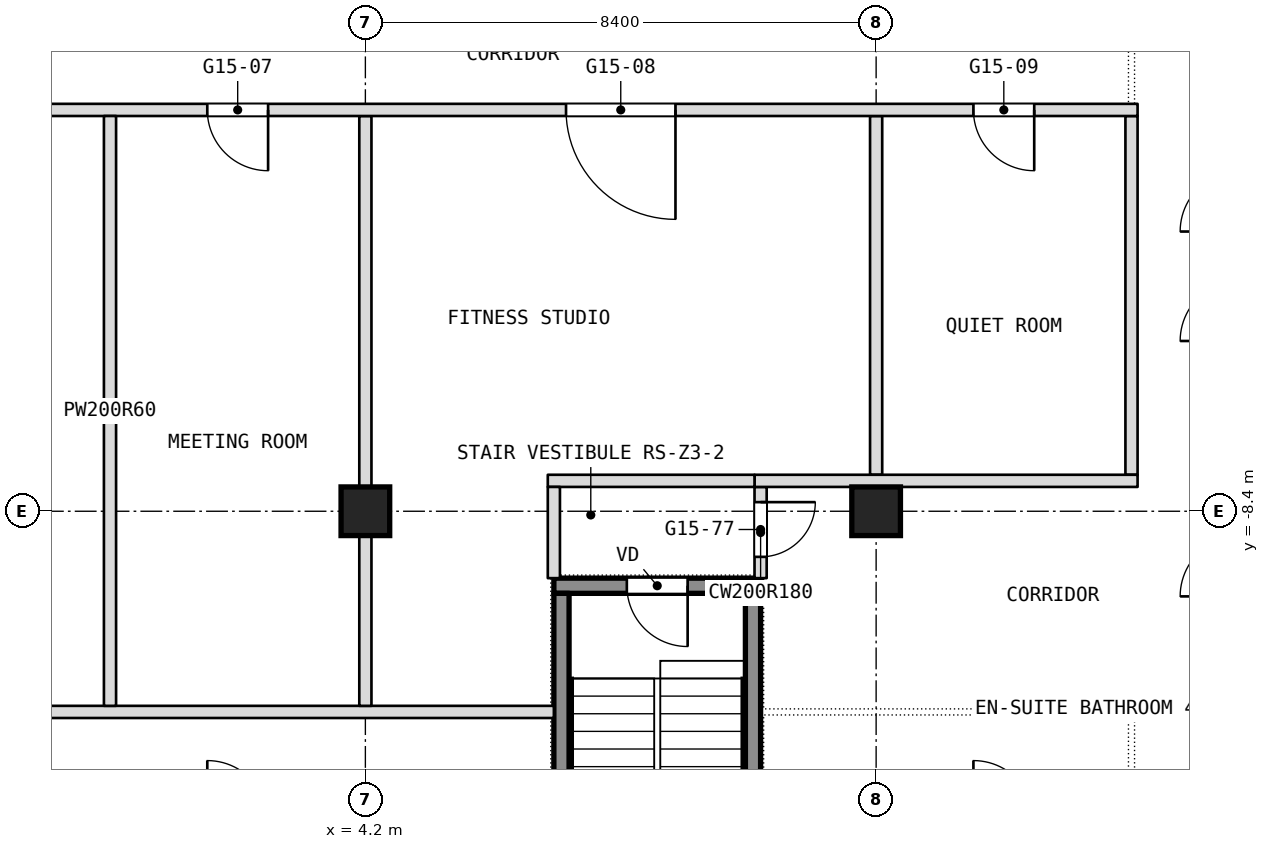
"""IFC4 building model, lengths in metres.
Left out: names, types, materials, properties, quantities, classifications, styles, units other than length and angle.
Written with IfcOpenShell. Run it as: python <this file> out.ifc"""

import sys

from ifc_helpers import new_model, si_unit, direction, frame, frame_2d, origin, origin_2d, place, context, subcontext, project, spatial, rectangle, extrude, element, fill, save


model = new_model("IFC4")
c1 = context("Model", 3, precision=1e-05, world=origin(), true_north=direction((0.0, 1.0)))
c2 = subcontext(c1, "Body", "Model", "MODEL_VIEW")
j1 = project(units=[si_unit("LENGTHUNIT", "METRE"), si_unit("PLANEANGLEUNIT", "RADIAN")], contexts=[c1])
p1 = place(None, origin())
s1 = spatial("IfcSite", under=j1, at=p1, CompositionType="ELEMENT")
p2 = place(p1, origin())
s2 = spatial("IfcBuilding", under=s1, at=p2, CompositionType="ELEMENT")
p3 = place(p2, frame((0.0, 0.0, 191.3)))
s3 = spatial("IfcBuildingStorey", under=s2, at=p3, CompositionType="ELEMENT", Elevation=191.3)
for number, where, z_axis, x_axis in (
    (1, (4.2, -8.4, 0.0), (0.0, 0.0, 1.0), (1.0, 0.0, 0.0)),
    (2, (12.6, -8.4, 0.0), (0.0, 0.0, 1.0), (1.0, 0.0, 0.0)),
):
    element("IfcColumn", number, at=place(p3, frame(where, z_axis=z_axis, x_axis=x_axis)), inside=s3, PredefinedType="COLUMN", context=c2, shape_type="SweptSolid", body=[
        extrude(rectangle(XDim=0.8, YDim=0.8, at=origin_2d()), origin(), (0.0, 0.0, 1.0), 3.6),
    ])
for number, where, z_axis, x_axis in (
    (3, (16.8, -7.8, 0.0), (0.0, 0.0, 1.0), (0.0, 1.0, 0.0)),
    (4, (12.6, -7.8, 0.0), (0.0, 0.0, 1.0), (0.0, 1.0, 0.0)),
):
    element("IfcWall", number, at=place(p3, frame(where, z_axis=z_axis, x_axis=x_axis)), inside=s3, PredefinedType="PARTITIONING", context=c2, shape_type="SweptSolid", body=[
        extrude(rectangle(XDim=5.9, YDim=0.2, at=frame_2d((2.95, 0.0))), origin(), (0.0, 0.0, 1.0), 3.34),
    ])
p4 = place(p3, frame((-7.3, -11.7, 0.0), z_axis=(0.0, 0.0, 1.0), x_axis=(1.0, 0.0, 0.0)))
e5 = element("IfcWall", 5, at=p4, inside=s3, PredefinedType="PARTITIONING", context=c2, shape_type="SweptSolid", body=[
    extrude(rectangle(XDim=14.6, YDim=0.2, at=frame_2d((7.3, 0.0))), origin(), (0.0, 0.0, 1.0), 3.34),
])
p5 = place(p3, frame((10.7, -9.5, 0.0), z_axis=(0.0, 0.0, 1.0), x_axis=(0.0, 1.0, 0.0)))
e6 = element("IfcWall", 6, at=p5, inside=s3, PredefinedType="PARTITIONING", context=c2, shape_type="SweptSolid", body=[
    extrude(rectangle(XDim=1.5, YDim=0.2, at=frame_2d((0.75, 0.0))), origin(), (0.0, 0.0, 1.0), 3.34),
])
p6 = place(p5, frame((0.35, 0.0, 0.0)))
e7 = element("IfcOpeningElement", 7, at=p6, cuts=e6, PredefinedType="OPENING", context=c2, shape_type="SweptSolid", body=[
    extrude(rectangle(XDim=0.9, YDim=2.1, at=frame_2d((0.45, 1.05))), frame((0.0, 0.1, 0.0), z_axis=(0.0, -1.0, 0.0), x_axis=(1.0, 0.0, 0.0)), (0.0, 0.0, 1.0), 0.2),
])
p7 = place(p3, frame((10.6, -7.9, 0.0), z_axis=(0.0, 0.0, 1.0), x_axis=(1.0, 0.0, 0.0)))
e8 = element("IfcWall", 8, at=p7, inside=s3, PredefinedType="PARTITIONING", context=c2, shape_type="SweptSolid", body=[
    extrude(rectangle(XDim=6.3, YDim=0.2, at=frame_2d((3.15, 0.0))), origin(), (0.0, 0.0, 1.0), 3.34),
])
p8 = place(p3, frame((7.2, -7.9, 0.0), z_axis=(0.0, 0.0, 1.0), x_axis=(1.0, 0.0, 0.0)))
e9 = element("IfcWall", 9, at=p8, inside=s3, PredefinedType="PARTITIONING", context=c2, shape_type="SweptSolid", body=[
    extrude(rectangle(XDim=3.4, YDim=0.2, at=frame_2d((1.7, 0.0))), origin(), (0.0, 0.0, 1.0), 3.34),
])
p9 = place(p3, frame((7.3, -9.5, 0.0), z_axis=(0.0, 0.0, 1.0), x_axis=(0.0, 1.0, 0.0)))
e10 = element("IfcWall", 10, at=p9, inside=s3, PredefinedType="PARTITIONING", context=c2, shape_type="SweptSolid", body=[
    extrude(rectangle(XDim=1.5, YDim=0.2, at=frame_2d((0.75, 0.0))), origin(), (0.0, 0.0, 1.0), 3.34),
])
p10 = place(p3, frame((4.2, -11.6, 0.0), z_axis=(0.0, 0.0, 1.0), x_axis=(0.0, 1.0, 0.0)))
e11 = element("IfcWall", 11, at=p10, inside=s3, PredefinedType="PARTITIONING", context=c2, shape_type="SweptSolid", body=[
    extrude(rectangle(XDim=9.7, YDim=0.2, at=frame_2d((4.85, 0.0))), origin(), (0.0, 0.0, 1.0), 3.34),
])
p11 = place(p3, frame((-16.9, -1.8, 0.0), z_axis=(0.0, 0.0, 1.0), x_axis=(1.0, 0.0, 0.0)))
e12 = element("IfcWall", 12, at=p11, inside=s3, PredefinedType="PARTITIONING", context=c2, shape_type="SweptSolid", body=[
    extrude(rectangle(XDim=33.8, YDim=0.2, at=frame_2d((16.9, 0.0))), origin(), (0.0, 0.0, 1.0), 3.34),
])
p12 = place(p11, frame((1.7, 0.0, 0.0)))
e13 = element("IfcOpeningElement", 13, at=p12, cuts=e12, PredefinedType="OPENING", context=c2, shape_type="SweptSolid", body=[
    extrude(rectangle(XDim=1.0, YDim=2.1, at=frame_2d((0.5, 1.05))), frame((0.0, 0.1, 0.0), z_axis=(0.0, -1.0, 0.0), x_axis=(1.0, 0.0, 0.0)), (0.0, 0.0, 1.0), 0.2),
])
p13 = place(p11, frame((5.9, 0.0, 0.0)))
e14 = element("IfcOpeningElement", 14, at=p13, cuts=e12, PredefinedType="OPENING", context=c2, shape_type="SweptSolid", body=[
    extrude(rectangle(XDim=1.0, YDim=2.1, at=frame_2d((0.5, 1.05))), frame((0.0, 0.1, 0.0), z_axis=(0.0, -1.0, 0.0), x_axis=(1.0, 0.0, 0.0)), (0.0, 0.0, 1.0), 0.2),
])
p14 = place(p11, frame((10.1, 0.0, 0.0)))
e15 = element("IfcOpeningElement", 15, at=p14, cuts=e12, PredefinedType="OPENING", context=c2, shape_type="SweptSolid", body=[
    extrude(rectangle(XDim=1.0, YDim=2.1, at=frame_2d((0.5, 1.05))), frame((0.0, 0.1, 0.0), z_axis=(0.0, -1.0, 0.0), x_axis=(1.0, 0.0, 0.0)), (0.0, 0.0, 1.0), 0.2),
])
p15 = place(p11, frame((14.3, 0.0, 0.0)))
e16 = element("IfcOpeningElement", 16, at=p15, cuts=e12, PredefinedType="OPENING", context=c2, shape_type="SweptSolid", body=[
    extrude(rectangle(XDim=1.0, YDim=2.1, at=frame_2d((0.5, 1.05))), frame((0.0, 0.1, 0.0), z_axis=(0.0, -1.0, 0.0), x_axis=(1.0, 0.0, 0.0)), (0.0, 0.0, 1.0), 0.2),
])
p16 = place(p11, frame((18.5, 0.0, 0.0)))
e17 = element("IfcOpeningElement", 17, at=p16, cuts=e12, PredefinedType="OPENING", context=c2, shape_type="SweptSolid", body=[
    extrude(rectangle(XDim=1.0, YDim=2.1, at=frame_2d((0.5, 1.05))), frame((0.0, 0.1, 0.0), z_axis=(0.0, -1.0, 0.0), x_axis=(1.0, 0.0, 0.0)), (0.0, 0.0, 1.0), 0.2),
])
p17 = place(p11, frame((24.4, 0.0, 0.0)))
e18 = element("IfcOpeningElement", 18, at=p17, cuts=e12, PredefinedType="OPENING", context=c2, shape_type="SweptSolid", body=[
    extrude(rectangle(XDim=1.8, YDim=2.1, at=frame_2d((0.9, 1.05))), frame((0.0, 0.1, 0.0), z_axis=(0.0, -1.0, 0.0), x_axis=(1.0, 0.0, 0.0)), (0.0, 0.0, 1.0), 0.2),
])
p18 = place(p11, frame((31.1, 0.0, 0.0)))
e19 = element("IfcOpeningElement", 19, at=p18, cuts=e12, PredefinedType="OPENING", context=c2, shape_type="SweptSolid", body=[
    extrude(rectangle(XDim=1.0, YDim=2.1, at=frame_2d((0.5, 1.05))), frame((0.0, 0.1, 0.0), z_axis=(0.0, -1.0, 0.0), x_axis=(1.0, 0.0, 0.0)), (0.0, 0.0, 1.0), 0.2),
])
p19 = place(p3, frame((0.0, -11.6, 0.0), z_axis=(0.0, 0.0, 1.0), x_axis=(0.0, 1.0, 0.0)))
e20 = element("IfcWall", 20, at=p19, inside=s3, PredefinedType="PARTITIONING", context=c2, shape_type="SweptSolid", body=[
    extrude(rectangle(XDim=9.7, YDim=0.2, at=frame_2d((4.85, 0.0))), origin(), (0.0, 0.0, 1.0), 3.34),
])
p20 = place(p3, frame((7.3, -9.625, 0.1), z_axis=(0.0, 0.0, 1.0), x_axis=(1.0, 0.0, 0.0)))
e21 = element("IfcWall", 21, at=p20, inside=s3, PredefinedType="SHEAR", context=c2, shape_type="SweptSolid", body=[
    extrude(rectangle(XDim=3.4, YDim=0.25, at=frame_2d((1.7, 0.0))), origin(), (0.0, 0.0, 1.0), 3.6),
])
p21 = place(p20, frame((1.2, 0.0, 0.0)))
e22 = element("IfcOpeningElement", 22, at=p21, cuts=e21, PredefinedType="OPENING", context=c2, shape_type="SweptSolid", body=[
    extrude(rectangle(XDim=1.0, YDim=2.1, at=frame_2d((0.5, 1.05))), frame((0.0, 0.125, 0.0), z_axis=(0.0, -1.0, 0.0), x_axis=(1.0, 0.0, 0.0)), (0.0, 0.0, 1.0), 0.25),
])
for number, where, z_axis, x_axis in (
    (23, (7.425, -15.45, 0.1), (0.0, 0.0, 1.0), (0.0, 1.0, 0.0)),
    (24, (10.575, -15.45, 0.1), (0.0, 0.0, 1.0), (0.0, 1.0, 0.0)),
):
    element("IfcWall", number, at=place(p3, frame(where, z_axis=z_axis, x_axis=x_axis)), inside=s3, PredefinedType="SHEAR", context=c2, shape_type="SweptSolid", body=[
        extrude(rectangle(XDim=5.7, YDim=0.25, at=frame_2d((2.85, 0.0))), origin(), (0.0, 0.0, 1.0), 3.6),
    ])
p22 = place(p6, origin())
e25 = element("IfcDoor", 25, at=p22, inside=s3, OperationType="SINGLE_SWING_RIGHT", PredefinedType="DOOR", context=c2, shape_type="SweptSolid", body=[
    extrude(rectangle(XDim=0.9, YDim=2.1, at=frame_2d((0.45, 1.05))), frame((0.0, 0.025, 0.0), z_axis=(0.0, -1.0, 0.0), x_axis=(1.0, 0.0, 0.0)), (0.0, 0.0, 1.0), 0.05),
])
fill(e7, e25)
p23 = place(p16, origin())
e26 = element("IfcDoor", 26, at=p23, inside=s3, OperationType="SINGLE_SWING_RIGHT", PredefinedType="DOOR", context=c2, shape_type="SweptSolid", body=[
    extrude(rectangle(XDim=1.0, YDim=2.1, at=frame_2d((0.5, 1.05))), frame((0.0, 0.025, 0.0), z_axis=(0.0, -1.0, 0.0), x_axis=(1.0, 0.0, 0.0)), (0.0, 0.0, 1.0), 0.05),
])
fill(e17, e26)
p24 = place(p17, origin())
e27 = element("IfcDoor", 27, at=p24, inside=s3, OperationType="DOUBLE_DOOR_SINGLE_SWING", PredefinedType="DOOR", context=c2, shape_type="SweptSolid", body=[
    extrude(rectangle(XDim=1.8, YDim=2.1, at=frame_2d((0.9, 1.05))), frame((0.0, 0.025, 0.0), z_axis=(0.0, -1.0, 0.0), x_axis=(1.0, 0.0, 0.0)), (0.0, 0.0, 1.0), 0.05),
])
fill(e18, e27)
p25 = place(p18, origin())
e28 = element("IfcDoor", 28, at=p25, inside=s3, OperationType="SINGLE_SWING_RIGHT", PredefinedType="DOOR", context=c2, shape_type="SweptSolid", body=[
    extrude(rectangle(XDim=1.0, YDim=2.1, at=frame_2d((0.5, 1.05))), frame((0.0, 0.025, 0.0), z_axis=(0.0, -1.0, 0.0), x_axis=(1.0, 0.0, 0.0)), (0.0, 0.0, 1.0), 0.05),
])
fill(e19, e28)
p26 = place(p21, origin())
e29 = element("IfcDoor", 29, at=p26, inside=s3, OperationType="SINGLE_SWING_LEFT", PredefinedType="DOOR", context=c2, shape_type="SweptSolid", body=[
    extrude(rectangle(XDim=1.0, YDim=2.1, at=frame_2d((0.5, 1.05))), frame((0.0, 0.025, 0.0), z_axis=(0.0, -1.0, 0.0), x_axis=(1.0, 0.0, 0.0)), (0.0, 0.0, 1.0), 0.05),
])
fill(e22, e29)
save(model, sys.argv[1])
